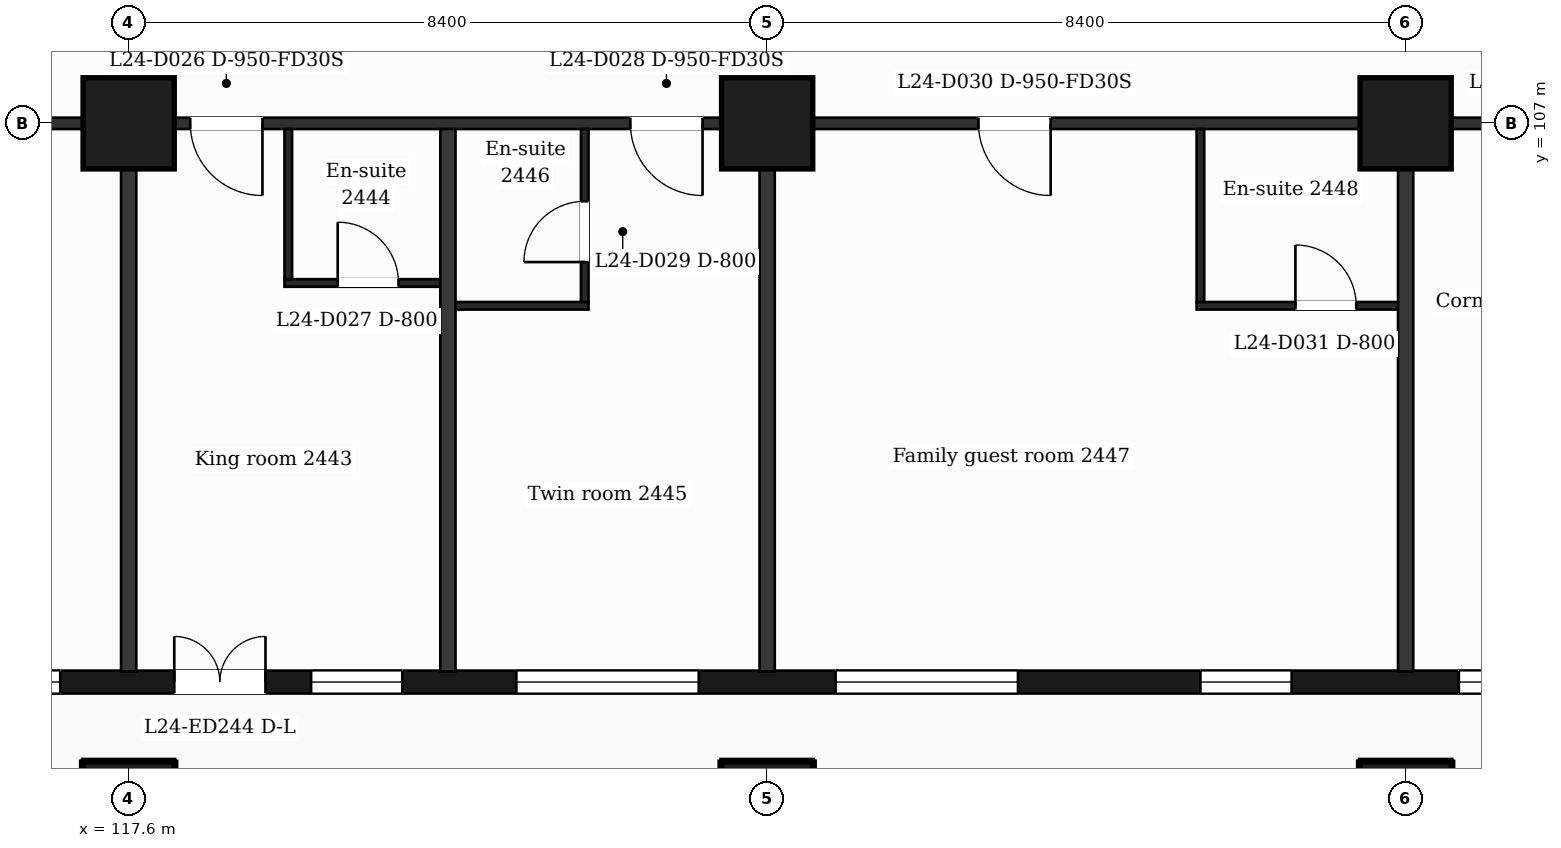
"""IFC4 building model, lengths in metres.
Left out: names, types, materials, properties, quantities, classifications, styles, units other than length and angle.
Written with IfcOpenShell. Run it as: python <this file> out.ifc"""

import sys

from ifc_helpers import new_model, si_unit, direction, frame, frame_2d, origin, origin_2d, place, context, subcontext, project, spatial, rectangle, extrude, element, fill, save


model = new_model("IFC4")
c1 = context("Model", 3, precision=1e-05, world=origin(), true_north=direction((0.0, 1.0)))
c2 = subcontext(c1, "Body", "Model", "MODEL_VIEW")
j1 = project(units=[si_unit("LENGTHUNIT", "METRE"), si_unit("PLANEANGLEUNIT", "RADIAN")], contexts=[c1])
p1 = place(None, origin())
s1 = spatial("IfcSite", under=j1, at=p1, CompositionType="ELEMENT")
p2 = place(p1, origin())
s2 = spatial("IfcBuilding", under=s1, at=p2, CompositionType="ELEMENT")
p3 = place(p2, frame((0.0, 0.0, 105.8)))
s3 = spatial("IfcBuildingStorey", under=s2, at=p3, CompositionType="ELEMENT", Elevation=105.8)
for number, where, z_axis, x_axis in (
    (1, (117.6, 98.0, 0.0), (0.0, 0.0, 1.0), (1.0, 0.0, 0.0)),
    (2, (126.0, 98.0, 0.0), (0.0, 0.0, 1.0), (1.0, 0.0, 0.0)),
    (3, (134.4, 98.0, 0.0), (0.0, 0.0, 1.0), (1.0, 0.0, 0.0)),
    (4, (117.6, 107.0, 0.0), (0.0, 0.0, 1.0), (1.0, 0.0, 0.0)),
    (5, (126.0, 107.0, 0.0), (0.0, 0.0, 1.0), (1.0, 0.0, 0.0)),
    (6, (134.4, 107.0, 0.0), (0.0, 0.0, 1.0), (1.0, 0.0, 0.0)),
):
    element("IfcColumn", number, at=place(p3, frame(where, z_axis=z_axis, x_axis=x_axis)), inside=s3, PredefinedType="COLUMN", context=c2, shape_type="SweptSolid", body=[
        extrude(rectangle(XDim=1.2, YDim=1.2, at=origin_2d()), origin(), (0.0, 0.0, 1.0), 3.7),
    ])
p4 = place(p3, frame((89.85, 99.65, 0.0), z_axis=(0.0, 0.0, 1.0), x_axis=(1.0, 0.0, 0.0)))
e7 = element("IfcWall", 7, at=p4, inside=s3, PredefinedType="SOLIDWALL", context=c2, shape_type="SweptSolid", body=[
    extrude(rectangle(XDim=47.25, YDim=0.3, at=frame_2d((23.625, 0.0))), origin(), (0.0, 0.0, 1.0), 3.38),
])
p5 = place(p4, frame((0.725, 0.0, 0.9)))
e8 = element("IfcOpeningElement", 8, at=p5, cuts=e7, PredefinedType="OPENING", context=c2, shape_type="SweptSolid", body=[
    extrude(rectangle(XDim=1.2, YDim=2.1, at=frame_2d((0.6, 1.05))), frame((0.0, 0.16, 0.0), z_axis=(0.0, -1.0, 0.0), x_axis=(1.0, 0.0, 0.0)), (0.0, 0.0, 1.0), 0.32),
])
p6 = place(p4, frame((3.45, 0.0, 0.9)))
e9 = element("IfcOpeningElement", 9, at=p6, cuts=e7, PredefinedType="OPENING", context=c2, shape_type="SweptSolid", body=[
    extrude(rectangle(XDim=2.4, YDim=2.1, at=frame_2d((1.2, 1.05))), frame((0.0, 0.16, 0.0), z_axis=(0.0, -1.0, 0.0), x_axis=(1.0, 0.0, 0.0)), (0.0, 0.0, 1.0), 0.32),
])
p7 = place(p4, frame((7.65, 0.0, 0.9)))
e10 = element("IfcOpeningElement", 10, at=p7, cuts=e7, PredefinedType="OPENING", context=c2, shape_type="SweptSolid", body=[
    extrude(rectangle(XDim=2.4, YDim=2.1, at=frame_2d((1.2, 1.05))), frame((0.0, 0.16, 0.0), z_axis=(0.0, -1.0, 0.0), x_axis=(1.0, 0.0, 0.0)), (0.0, 0.0, 1.0), 0.32),
])
p8 = place(p4, frame((12.45, 0.0, 0.9)))
e11 = element("IfcOpeningElement", 11, at=p8, cuts=e7, PredefinedType="OPENING", context=c2, shape_type="SweptSolid", body=[
    extrude(rectangle(XDim=1.2, YDim=2.1, at=frame_2d((0.6, 1.05))), frame((0.0, 0.16, 0.0), z_axis=(0.0, -1.0, 0.0), x_axis=(1.0, 0.0, 0.0)), (0.0, 0.0, 1.0), 0.32),
])
p9 = place(p4, frame((16.65, 0.0, 0.9)))
e12 = element("IfcOpeningElement", 12, at=p9, cuts=e7, PredefinedType="OPENING", context=c2, shape_type="SweptSolid", body=[
    extrude(rectangle(XDim=1.2, YDim=2.1, at=frame_2d((0.6, 1.05))), frame((0.0, 0.16, 0.0), z_axis=(0.0, -1.0, 0.0), x_axis=(1.0, 0.0, 0.0)), (0.0, 0.0, 1.0), 0.32),
])
p10 = place(p4, frame((19.95, 0.0, 0.0)))
e13 = element("IfcOpeningElement", 13, at=p10, cuts=e7, PredefinedType="OPENING", context=c2, shape_type="SweptSolid", body=[
    extrude(rectangle(XDim=1.2, YDim=2.4, at=frame_2d((0.6, 1.2))), frame((0.0, 0.16, 0.0), z_axis=(0.0, -1.0, 0.0), x_axis=(1.0, 0.0, 0.0)), (0.0, 0.0, 1.0), 0.32),
])
p11 = place(p4, frame((21.75, 0.0, 0.9)))
e14 = element("IfcOpeningElement", 14, at=p11, cuts=e7, PredefinedType="OPENING", context=c2, shape_type="SweptSolid", body=[
    extrude(rectangle(XDim=1.2, YDim=2.1, at=frame_2d((0.6, 1.05))), frame((0.0, 0.16, 0.0), z_axis=(0.0, -1.0, 0.0), x_axis=(1.0, 0.0, 0.0)), (0.0, 0.0, 1.0), 0.32),
])
p12 = place(p4, frame((24.45, 0.0, 0.9)))
e15 = element("IfcOpeningElement", 15, at=p12, cuts=e7, PredefinedType="OPENING", context=c2, shape_type="SweptSolid", body=[
    extrude(rectangle(XDim=2.4, YDim=2.1, at=frame_2d((1.2, 1.05))), frame((0.0, 0.16, 0.0), z_axis=(0.0, -1.0, 0.0), x_axis=(1.0, 0.0, 0.0)), (0.0, 0.0, 1.0), 0.32),
])
p13 = place(p4, frame((28.35, 0.0, 0.0)))
e16 = element("IfcOpeningElement", 16, at=p13, cuts=e7, PredefinedType="OPENING", context=c2, shape_type="SweptSolid", body=[
    extrude(rectangle(XDim=1.2, YDim=2.4, at=frame_2d((0.6, 1.2))), frame((0.0, 0.16, 0.0), z_axis=(0.0, -1.0, 0.0), x_axis=(1.0, 0.0, 0.0)), (0.0, 0.0, 1.0), 0.32),
])
p14 = place(p4, frame((30.15, 0.0, 0.9)))
e17 = element("IfcOpeningElement", 17, at=p14, cuts=e7, PredefinedType="OPENING", context=c2, shape_type="SweptSolid", body=[
    extrude(rectangle(XDim=1.2, YDim=2.1, at=frame_2d((0.6, 1.05))), frame((0.0, 0.16, 0.0), z_axis=(0.0, -1.0, 0.0), x_axis=(1.0, 0.0, 0.0)), (0.0, 0.0, 1.0), 0.32),
])
p15 = place(p4, frame((32.85, 0.0, 0.9)))
e18 = element("IfcOpeningElement", 18, at=p15, cuts=e7, PredefinedType="OPENING", context=c2, shape_type="SweptSolid", body=[
    extrude(rectangle(XDim=2.4, YDim=2.1, at=frame_2d((1.2, 1.05))), frame((0.0, 0.16, 0.0), z_axis=(0.0, -1.0, 0.0), x_axis=(1.0, 0.0, 0.0)), (0.0, 0.0, 1.0), 0.32),
])
p16 = place(p4, frame((37.05, 0.0, 0.9)))
e19 = element("IfcOpeningElement", 19, at=p16, cuts=e7, PredefinedType="OPENING", context=c2, shape_type="SweptSolid", body=[
    extrude(rectangle(XDim=2.4, YDim=2.1, at=frame_2d((1.2, 1.05))), frame((0.0, 0.16, 0.0), z_axis=(0.0, -1.0, 0.0), x_axis=(1.0, 0.0, 0.0)), (0.0, 0.0, 1.0), 0.32),
])
p17 = place(p4, frame((41.85, 0.0, 0.9)))
e20 = element("IfcOpeningElement", 20, at=p17, cuts=e7, PredefinedType="OPENING", context=c2, shape_type="SweptSolid", body=[
    extrude(rectangle(XDim=1.2, YDim=2.1, at=frame_2d((0.6, 1.05))), frame((0.0, 0.16, 0.0), z_axis=(0.0, -1.0, 0.0), x_axis=(1.0, 0.0, 0.0)), (0.0, 0.0, 1.0), 0.32),
])
p18 = place(p4, frame((45.25, 0.0, 0.9)))
e21 = element("IfcOpeningElement", 21, at=p18, cuts=e7, PredefinedType="OPENING", context=c2, shape_type="SweptSolid", body=[
    extrude(rectangle(XDim=1.2, YDim=2.1, at=frame_2d((0.6, 1.05))), frame((0.0, 0.16, 0.0), z_axis=(0.0, -1.0, 0.0), x_axis=(1.0, 0.0, 0.0)), (0.0, 0.0, 1.0), 0.32),
])
p19 = place(p3, frame((121.8, 104.6, 0.0), z_axis=(0.0, 0.0, 1.0), x_axis=(1.0, 0.0, 0.0)))
e22 = element("IfcWall", 22, at=p19, inside=s3, PredefinedType="PARTITIONING", context=c2, shape_type="SweptSolid", body=[
    extrude(rectangle(XDim=1.85, YDim=0.1, at=frame_2d((0.925, 0.0))), origin(), (0.0, 0.0, 1.0), 3.38),
])
p20 = place(p3, frame((131.65, 104.6, 0.0), z_axis=(0.0, 0.0, 1.0), x_axis=(1.0, 0.0, 0.0)))
e23 = element("IfcWall", 23, at=p20, inside=s3, PredefinedType="PARTITIONING", context=c2, shape_type="SweptSolid", body=[
    extrude(rectangle(XDim=2.75, YDim=0.1, at=frame_2d((1.375, 0.0))), origin(), (0.0, 0.0, 1.0), 3.38),
])
p21 = place(p20, frame((1.3, 0.0, 0.0)))
e24 = element("IfcOpeningElement", 24, at=p21, cuts=e23, PredefinedType="OPENING", context=c2, shape_type="SweptSolid", body=[
    extrude(rectangle(XDim=0.8, YDim=2.1, at=frame_2d((0.4, 1.05))), frame((0.0, 0.06, 0.0), z_axis=(0.0, -1.0, 0.0), x_axis=(1.0, 0.0, 0.0)), (0.0, 0.0, 1.0), 0.12),
])
p22 = place(p3, frame((119.65, 104.9, 0.0), z_axis=(0.0, 0.0, 1.0), x_axis=(1.0, 0.0, 0.0)))
e25 = element("IfcWall", 25, at=p22, inside=s3, PredefinedType="PARTITIONING", context=c2, shape_type="SweptSolid", body=[
    extrude(rectangle(XDim=2.15, YDim=0.1, at=frame_2d((1.075, 0.0))), origin(), (0.0, 0.0, 1.0), 3.38),
])
p23 = place(p22, frame((0.7, 0.0, 0.0)))
e26 = element("IfcOpeningElement", 26, at=p23, cuts=e25, PredefinedType="OPENING", context=c2, shape_type="SweptSolid", body=[
    extrude(rectangle(XDim=0.8, YDim=2.1, at=frame_2d((0.4, 1.05))), frame((0.0, 0.06, 0.0), z_axis=(0.0, -1.0, 0.0), x_axis=(1.0, 0.0, 0.0)), (0.0, 0.0, 1.0), 0.12),
])
p24 = place(p3, frame((87.018, 107.0, 0.0), z_axis=(0.0, 0.0, 1.0), x_axis=(1.0, 0.0, 0.0)))
e27 = element("IfcWall", 27, at=p24, inside=s3, PredefinedType="PARTITIONING", context=c2, shape_type="SweptSolid", body=[
    extrude(rectangle(XDim=52.765, YDim=0.15, at=frame_2d((26.382, 0.0))), origin(), (0.0, 0.0, 1.0), 3.38),
])
p25 = place(p24, frame((1.276, 0.0, 0.0)))
e28 = element("IfcOpeningElement", 28, at=p25, cuts=e27, PredefinedType="OPENING", context=c2, shape_type="SweptSolid", body=[
    extrude(rectangle(XDim=0.95, YDim=2.1, at=frame_2d((0.475, 1.05))), frame((0.0, 0.085, 0.0), z_axis=(0.0, -1.0, 0.0), x_axis=(1.0, 0.0, 0.0)), (0.0, 0.0, 1.0), 0.17),
])
p26 = place(p24, frame((6.152, 0.0, 0.0)))
e29 = element("IfcOpeningElement", 29, at=p26, cuts=e27, PredefinedType="OPENING", context=c2, shape_type="SweptSolid", body=[
    extrude(rectangle(XDim=0.95, YDim=2.1, at=frame_2d((0.475, 1.05))), frame((0.0, 0.085, 0.0), z_axis=(0.0, -1.0, 0.0), x_axis=(1.0, 0.0, 0.0)), (0.0, 0.0, 1.0), 0.17),
])
p27 = place(p24, frame((14.59, 0.0, 0.0)))
e30 = element("IfcOpeningElement", 30, at=p27, cuts=e27, PredefinedType="OPENING", context=c2, shape_type="SweptSolid", body=[
    extrude(rectangle(XDim=0.95, YDim=2.1, at=frame_2d((0.475, 1.05))), frame((0.0, 0.085, 0.0), z_axis=(0.0, -1.0, 0.0), x_axis=(1.0, 0.0, 0.0)), (0.0, 0.0, 1.0), 0.17),
])
p28 = place(p24, frame((18.257, 0.0, 0.0)))
e31 = element("IfcOpeningElement", 31, at=p28, cuts=e27, PredefinedType="OPENING", context=c2, shape_type="SweptSolid", body=[
    extrude(rectangle(XDim=0.95, YDim=2.1, at=frame_2d((0.475, 1.05))), frame((0.0, 0.085, 0.0), z_axis=(0.0, -1.0, 0.0), x_axis=(1.0, 0.0, 0.0)), (0.0, 0.0, 1.0), 0.17),
])
p29 = place(p24, frame((26.672, 0.0, 0.0)))
e32 = element("IfcOpeningElement", 32, at=p29, cuts=e27, PredefinedType="OPENING", context=c2, shape_type="SweptSolid", body=[
    extrude(rectangle(XDim=0.95, YDim=2.1, at=frame_2d((0.475, 1.05))), frame((0.0, 0.085, 0.0), z_axis=(0.0, -1.0, 0.0), x_axis=(1.0, 0.0, 0.0)), (0.0, 0.0, 1.0), 0.17),
])
p30 = place(p24, frame((31.392, 0.0, 0.0)))
e33 = element("IfcOpeningElement", 33, at=p30, cuts=e27, PredefinedType="OPENING", context=c2, shape_type="SweptSolid", body=[
    extrude(rectangle(XDim=0.95, YDim=2.1, at=frame_2d((0.475, 1.05))), frame((0.0, 0.085, 0.0), z_axis=(0.0, -1.0, 0.0), x_axis=(1.0, 0.0, 0.0)), (0.0, 0.0, 1.0), 0.17),
])
p31 = place(p24, frame((37.182, 0.0, 0.0)))
e34 = element("IfcOpeningElement", 34, at=p31, cuts=e27, PredefinedType="OPENING", context=c2, shape_type="SweptSolid", body=[
    extrude(rectangle(XDim=0.95, YDim=2.1, at=frame_2d((0.475, 1.05))), frame((0.0, 0.085, 0.0), z_axis=(0.0, -1.0, 0.0), x_axis=(1.0, 0.0, 0.0)), (0.0, 0.0, 1.0), 0.17),
])
p32 = place(p24, frame((41.762, 0.0, 0.0)))
e35 = element("IfcOpeningElement", 35, at=p32, cuts=e27, PredefinedType="OPENING", context=c2, shape_type="SweptSolid", body=[
    extrude(rectangle(XDim=0.95, YDim=2.1, at=frame_2d((0.475, 1.05))), frame((0.0, 0.085, 0.0), z_axis=(0.0, -1.0, 0.0), x_axis=(1.0, 0.0, 0.0)), (0.0, 0.0, 1.0), 0.17),
])
p33 = place(p24, frame((49.285, 0.0, 0.0)))
e36 = element("IfcOpeningElement", 36, at=p33, cuts=e27, PredefinedType="OPENING", context=c2, shape_type="SweptSolid", body=[
    extrude(rectangle(XDim=0.95, YDim=2.1, at=frame_2d((0.475, 1.05))), frame((0.0, 0.085, 0.0), z_axis=(0.0, -1.0, 0.0), x_axis=(1.0, 0.0, 0.0)), (0.0, 0.0, 1.0), 0.17),
])
p34 = place(p3, frame((117.6, 99.79, 0.0), z_axis=(0.0, 0.0, 1.0), x_axis=(0.0, 1.0, 0.0)))
e37 = element("IfcWall", 37, at=p34, inside=s3, PredefinedType="PARTITIONING", context=c2, shape_type="SweptSolid", body=[
    extrude(rectangle(XDim=7.135, YDim=0.2, at=frame_2d((3.567, 0.0))), origin(), (0.0, 0.0, 1.0), 3.38),
])
p35 = place(p3, frame((119.7, 104.95, 0.0), z_axis=(0.0, 0.0, 1.0), x_axis=(0.0, 1.0, 0.0)))
e38 = element("IfcWall", 38, at=p35, inside=s3, PredefinedType="PARTITIONING", context=c2, shape_type="SweptSolid", body=[
    extrude(rectangle(XDim=1.975, YDim=0.1, at=frame_2d((0.988, 0.0))), origin(), (0.0, 0.0, 1.0), 3.38),
])
p36 = place(p3, frame((121.8, 99.79, 0.0), z_axis=(0.0, 0.0, 1.0), x_axis=(0.0, 1.0, 0.0)))
e39 = element("IfcWall", 39, at=p36, inside=s3, PredefinedType="PARTITIONING", context=c2, shape_type="SweptSolid", body=[
    extrude(rectangle(XDim=7.135, YDim=0.2, at=frame_2d((3.567, 0.0))), origin(), (0.0, 0.0, 1.0), 3.38),
])
p37 = place(p3, frame((123.6, 104.65, 0.0), z_axis=(0.0, 0.0, 1.0), x_axis=(0.0, 1.0, 0.0)))
e40 = element("IfcWall", 40, at=p37, inside=s3, PredefinedType="PARTITIONING", context=c2, shape_type="SweptSolid", body=[
    extrude(rectangle(XDim=2.275, YDim=0.1, at=frame_2d((1.138, 0.0))), origin(), (0.0, 0.0, 1.0), 3.38),
])
p38 = place(p37, frame((0.525, 0.0, 0.0)))
e41 = element("IfcOpeningElement", 41, at=p38, cuts=e40, PredefinedType="OPENING", context=c2, shape_type="SweptSolid", body=[
    extrude(rectangle(XDim=0.8, YDim=2.1, at=frame_2d((0.4, 1.05))), frame((0.0, 0.06, 0.0), z_axis=(0.0, -1.0, 0.0), x_axis=(1.0, 0.0, 0.0)), (0.0, 0.0, 1.0), 0.12),
])
p39 = place(p3, frame((126.0, 99.79, 0.0), z_axis=(0.0, 0.0, 1.0), x_axis=(0.0, 1.0, 0.0)))
e42 = element("IfcWall", 42, at=p39, inside=s3, PredefinedType="PARTITIONING", context=c2, shape_type="SweptSolid", body=[
    extrude(rectangle(XDim=7.135, YDim=0.2, at=frame_2d((3.567, 0.0))), origin(), (0.0, 0.0, 1.0), 3.38),
])
p40 = place(p3, frame((131.7, 104.65, 0.0), z_axis=(0.0, 0.0, 1.0), x_axis=(0.0, 1.0, 0.0)))
e43 = element("IfcWall", 43, at=p40, inside=s3, PredefinedType="PARTITIONING", context=c2, shape_type="SweptSolid", body=[
    extrude(rectangle(XDim=2.275, YDim=0.1, at=frame_2d((1.138, 0.0))), origin(), (0.0, 0.0, 1.0), 3.38),
])
p41 = place(p3, frame((134.4, 99.79, 0.0), z_axis=(0.0, 0.0, 1.0), x_axis=(0.0, 1.0, 0.0)))
e44 = element("IfcWall", 44, at=p41, inside=s3, PredefinedType="PARTITIONING", context=c2, shape_type="SweptSolid", body=[
    extrude(rectangle(XDim=7.135, YDim=0.2, at=frame_2d((3.567, 0.0))), origin(), (0.0, 0.0, 1.0), 3.38),
])
p42 = place(p12, origin())
e45 = element("IfcWindow", 45, at=p42, inside=s3, PartitioningType="SINGLE_PANEL", PredefinedType="WINDOW", context=c2, shape_type="SweptSolid", body=[
    extrude(rectangle(XDim=2.4, YDim=2.1, at=frame_2d((1.2, 1.05))), frame((0.0, 0.03, 0.0), z_axis=(0.0, -1.0, 0.0), x_axis=(1.0, 0.0, 0.0)), (0.0, 0.0, 1.0), 0.06),
])
fill(e15, e45)
p43 = place(p13, origin())
e46 = element("IfcDoor", 46, at=p43, inside=s3, OperationType="DOUBLE_DOOR_SINGLE_SWING", PredefinedType="DOOR", context=c2, shape_type="SweptSolid", body=[
    extrude(rectangle(XDim=1.2, YDim=2.4, at=frame_2d((0.6, 1.2))), frame((0.0, 0.025, 0.0), z_axis=(0.0, -1.0, 0.0), x_axis=(1.0, 0.0, 0.0)), (0.0, 0.0, 1.0), 0.05),
])
fill(e16, e46)
p44 = place(p14, origin())
e47 = element("IfcWindow", 47, at=p44, inside=s3, PartitioningType="SINGLE_PANEL", PredefinedType="WINDOW", context=c2, shape_type="SweptSolid", body=[
    extrude(rectangle(XDim=1.2, YDim=2.1, at=frame_2d((0.6, 1.05))), frame((0.0, 0.03, 0.0), z_axis=(0.0, -1.0, 0.0), x_axis=(1.0, 0.0, 0.0)), (0.0, 0.0, 1.0), 0.06),
])
fill(e17, e47)
p45 = place(p15, origin())
e48 = element("IfcWindow", 48, at=p45, inside=s3, PartitioningType="SINGLE_PANEL", PredefinedType="WINDOW", context=c2, shape_type="SweptSolid", body=[
    extrude(rectangle(XDim=2.4, YDim=2.1, at=frame_2d((1.2, 1.05))), frame((0.0, 0.03, 0.0), z_axis=(0.0, -1.0, 0.0), x_axis=(1.0, 0.0, 0.0)), (0.0, 0.0, 1.0), 0.06),
])
fill(e18, e48)
p46 = place(p16, origin())
e49 = element("IfcWindow", 49, at=p46, inside=s3, PartitioningType="SINGLE_PANEL", PredefinedType="WINDOW", context=c2, shape_type="SweptSolid", body=[
    extrude(rectangle(XDim=2.4, YDim=2.1, at=frame_2d((1.2, 1.05))), frame((0.0, 0.03, 0.0), z_axis=(0.0, -1.0, 0.0), x_axis=(1.0, 0.0, 0.0)), (0.0, 0.0, 1.0), 0.06),
])
fill(e19, e49)
p47 = place(p17, origin())
e50 = element("IfcWindow", 50, at=p47, inside=s3, PartitioningType="SINGLE_PANEL", PredefinedType="WINDOW", context=c2, shape_type="SweptSolid", body=[
    extrude(rectangle(XDim=1.2, YDim=2.1, at=frame_2d((0.6, 1.05))), frame((0.0, 0.03, 0.0), z_axis=(0.0, -1.0, 0.0), x_axis=(1.0, 0.0, 0.0)), (0.0, 0.0, 1.0), 0.06),
])
fill(e20, e50)
p48 = place(p18, origin())
e51 = element("IfcWindow", 51, at=p48, inside=s3, PartitioningType="SINGLE_PANEL", PredefinedType="WINDOW", context=c2, shape_type="SweptSolid", body=[
    extrude(rectangle(XDim=1.2, YDim=2.1, at=frame_2d((0.6, 1.05))), frame((0.0, 0.03, 0.0), z_axis=(0.0, -1.0, 0.0), x_axis=(1.0, 0.0, 0.0)), (0.0, 0.0, 1.0), 0.06),
])
fill(e21, e51)
p49 = place(p30, origin())
e52 = element("IfcDoor", 52, at=p49, inside=s3, OperationType="SINGLE_SWING_RIGHT", PredefinedType="DOOR", context=c2, shape_type="SweptSolid", body=[
    extrude(rectangle(XDim=0.95, YDim=2.1, at=frame_2d((0.475, 1.05))), frame((0.0, 0.025, 0.0), z_axis=(0.0, -1.0, 0.0), x_axis=(1.0, 0.0, 0.0)), (0.0, 0.0, 1.0), 0.05),
])
fill(e33, e52)
p50 = place(p23, origin())
e53 = element("IfcDoor", 53, at=p50, inside=s3, OperationType="SINGLE_SWING_LEFT", PredefinedType="DOOR", context=c2, shape_type="SweptSolid", body=[
    extrude(rectangle(XDim=0.8, YDim=2.1, at=frame_2d((0.4, 1.05))), frame((0.0, 0.025, 0.0), z_axis=(0.0, -1.0, 0.0), x_axis=(1.0, 0.0, 0.0)), (0.0, 0.0, 1.0), 0.05),
])
fill(e26, e53)
p51 = place(p31, origin())
e54 = element("IfcDoor", 54, at=p51, inside=s3, OperationType="SINGLE_SWING_RIGHT", PredefinedType="DOOR", context=c2, shape_type="SweptSolid", body=[
    extrude(rectangle(XDim=0.95, YDim=2.1, at=frame_2d((0.475, 1.05))), frame((0.0, 0.025, 0.0), z_axis=(0.0, -1.0, 0.0), x_axis=(1.0, 0.0, 0.0)), (0.0, 0.0, 1.0), 0.05),
])
fill(e34, e54)
p52 = place(p38, origin())
e55 = element("IfcDoor", 55, at=p52, inside=s3, OperationType="SINGLE_SWING_LEFT", PredefinedType="DOOR", context=c2, shape_type="SweptSolid", body=[
    extrude(rectangle(XDim=0.8, YDim=2.1, at=frame_2d((0.4, 1.05))), frame((0.0, 0.025, 0.0), z_axis=(0.0, -1.0, 0.0), x_axis=(1.0, 0.0, 0.0)), (0.0, 0.0, 1.0), 0.05),
])
fill(e41, e55)
p53 = place(p32, origin())
e56 = element("IfcDoor", 56, at=p53, inside=s3, OperationType="SINGLE_SWING_RIGHT", PredefinedType="DOOR", context=c2, shape_type="SweptSolid", body=[
    extrude(rectangle(XDim=0.95, YDim=2.1, at=frame_2d((0.475, 1.05))), frame((0.0, 0.025, 0.0), z_axis=(0.0, -1.0, 0.0), x_axis=(1.0, 0.0, 0.0)), (0.0, 0.0, 1.0), 0.05),
])
fill(e35, e56)
p54 = place(p21, origin())
e57 = element("IfcDoor", 57, at=p54, inside=s3, OperationType="SINGLE_SWING_LEFT", PredefinedType="DOOR", context=c2, shape_type="SweptSolid", body=[
    extrude(rectangle(XDim=0.8, YDim=2.1, at=frame_2d((0.4, 1.05))), frame((0.0, 0.025, 0.0), z_axis=(0.0, -1.0, 0.0), x_axis=(1.0, 0.0, 0.0)), (0.0, 0.0, 1.0), 0.05),
])
fill(e24, e57)
save(model, sys.argv[1])
